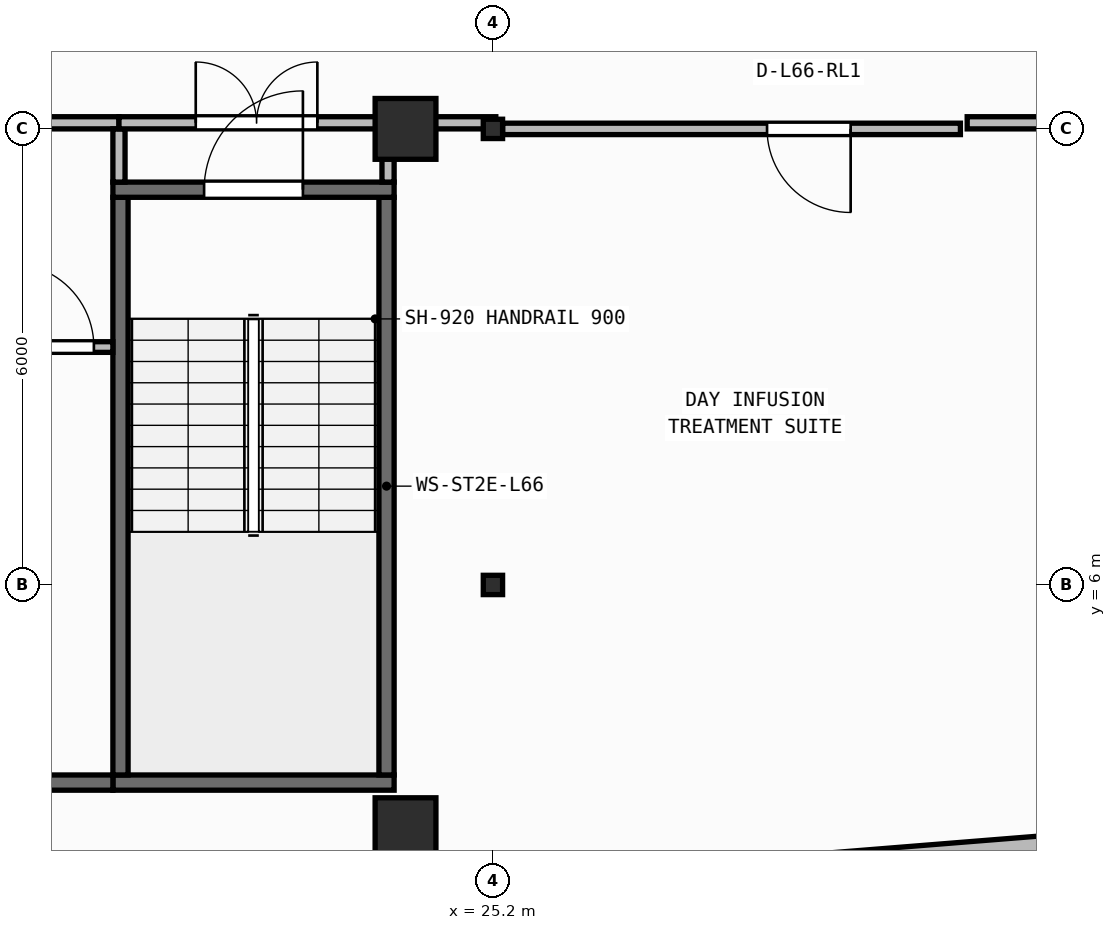
"""IFC4 building model, lengths in metres.
Left out: names, types, materials, properties, quantities, classifications, styles, units other than length and angle.
Written with IfcOpenShell. Run it as: python <this file> out.ifc"""

import sys

from ifc_helpers import new_model, si_unit, direction, frame, frame_2d, origin, origin_2d, place, context, subcontext, project, spatial, rectangle, i_section, extrude, element, fill, save


model = new_model("IFC4")
c1 = context("Model", 3, precision=1e-05, world=origin(), true_north=direction((0.0, 1.0)))
c2 = subcontext(c1, "Body", "Model", "MODEL_VIEW")
j1 = project(units=[si_unit("LENGTHUNIT", "METRE"), si_unit("PLANEANGLEUNIT", "RADIAN")], contexts=[c1])
p1 = place(None, origin())
s1 = spatial("IfcSite", under=j1, at=p1, CompositionType="ELEMENT")
p2 = place(p1, origin())
s2 = spatial("IfcBuilding", under=s1, at=p2, CompositionType="ELEMENT")
p3 = place(p2, frame((0.0, 0.0, 268.4)))
s3 = spatial("IfcBuildingStorey", under=s2, at=p3, CompositionType="ELEMENT", Elevation=268.4)
p4 = place(p3, frame((24.05, 2.8, 0.0), z_axis=(0.0, 0.0, 1.0), x_axis=(1.0, 0.0, 0.0)))
e1 = element("IfcColumn", 1, at=p4, inside=s3, PredefinedType="COLUMN", context=c2, shape_type="SweptSolid", body=[
    extrude(rectangle(XDim=0.8, YDim=0.8, at=origin_2d()), origin(), (0.0, 0.0, 1.0), 3.95),
])
p5 = place(p3, frame((25.2, 6.0, 0.0), z_axis=(0.0, 0.0, 1.0), x_axis=(1.0, 0.0, 0.0)))
e2 = element("IfcColumn", 2, at=p5, inside=s3, PredefinedType="COLUMN", context=c2, shape_type="SweptSolid", body=[
    extrude(i_section(OverallWidth=0.254, OverallDepth=0.254, WebThickness=0.009, FlangeThickness=0.014, FilletRadius=0.013, at=origin_2d()), origin(), (0.0, 0.0, 1.0), 3.95),
])
p6 = place(p3, frame((24.05, 12.0, 0.0), z_axis=(0.0, 0.0, 1.0), x_axis=(1.0, 0.0, 0.0)))
e3 = element("IfcColumn", 3, at=p6, inside=s3, PredefinedType="COLUMN", context=c2, shape_type="SweptSolid", body=[
    extrude(rectangle(XDim=0.8, YDim=0.8, at=origin_2d()), origin(), (0.0, 0.0, 1.0), 3.95),
])
p7 = place(p3, frame((25.2, 12.0, 0.0), z_axis=(0.0, 0.0, 1.0), x_axis=(1.0, 0.0, 0.0)))
e4 = element("IfcColumn", 4, at=p7, inside=s3, PredefinedType="COLUMN", context=c2, shape_type="SweptSolid", body=[
    extrude(i_section(OverallWidth=0.254, OverallDepth=0.254, WebThickness=0.009, FlangeThickness=0.014, FilletRadius=0.013, at=origin_2d()), origin(), (0.0, 0.0, 1.0), 3.95),
])
p8 = place(p3, frame((2.56, 0.173, 0.0), z_axis=(0.0, 0.0, 1.0), x_axis=(0.996798206282, 0.079958338856, 0.0)))
e5 = element("IfcWall", 5, at=p8, inside=s3, PredefinedType="STANDARD", context=c2, shape_type="SweptSolid", body=[
    extrude(rectangle(XDim=37.199, YDim=0.26, at=frame_2d((18.6, 0.0))), origin(), (0.0, 0.0, 1.0), 3.71),
])
p9 = place(p8, frame((17.4, 0.0, 0.9)))
e6 = element("IfcOpeningElement", 6, at=p9, cuts=e5, PredefinedType="OPENING", context=c2, shape_type="SweptSolid", body=[
    extrude(rectangle(XDim=2.4, YDim=1.65, at=frame_2d((1.2, 0.825))), frame((0.0, 0.14, 0.0), z_axis=(0.0, -1.0, 0.0), x_axis=(1.0, 0.0, 0.0)), (0.0, 0.0, 1.0), 0.28),
])
p10 = place(p3, frame((20.2, 3.4, 0.0), z_axis=(0.0, 0.0, 1.0), x_axis=(1.0, 0.0, 0.0)))
e7 = element("IfcWall", 7, at=p10, inside=s3, PredefinedType="SHEAR", context=c2, shape_type="SweptSolid", body=[
    extrude(rectangle(XDim=3.7, YDim=0.2, at=frame_2d((1.85, 0.0))), origin(), (0.0, 0.0, 1.0), 3.71),
])
for number, where, z_axis, x_axis in (
    (8, (20.3, 3.5, 0.0), (0.0, 0.0, 1.0), (0.0, 1.0, 0.0)),
    (9, (23.8, 3.5, 0.0), (0.0, 0.0, 1.0), (0.0, 1.0, 0.0)),
):
    element("IfcWall", number, at=place(p3, frame(where, z_axis=z_axis, x_axis=x_axis)), inside=s3, PredefinedType="SHEAR", context=c2, shape_type="SweptSolid", body=[
        extrude(rectangle(XDim=7.6, YDim=0.2, at=frame_2d((3.8, 0.0))), origin(), (0.0, 0.0, 1.0), 3.71),
    ])
p11 = place(p3, frame((20.2, 11.2, 0.0), z_axis=(0.0, 0.0, 1.0), x_axis=(1.0, 0.0, 0.0)))
e10 = element("IfcWall", 10, at=p11, inside=s3, PredefinedType="SHEAR", context=c2, shape_type="SweptSolid", body=[
    extrude(rectangle(XDim=3.7, YDim=0.2, at=frame_2d((1.85, 0.0))), origin(), (0.0, 0.0, 1.0), 3.71),
])
p12 = place(p11, frame((1.2, 0.0, 0.0)))
e11 = element("IfcOpeningElement", 11, at=p12, cuts=e10, PredefinedType="OPENING", context=c2, shape_type="SweptSolid", body=[
    extrude(rectangle(XDim=1.3, YDim=2.15, at=frame_2d((0.65, 1.075))), frame((0.0, 0.11, 0.0), z_axis=(0.0, -1.0, 0.0), x_axis=(1.0, 0.0, 0.0)), (0.0, 0.0, 1.0), 0.22),
])
p13 = place(p3, frame((6.5, 3.4, 0.0), z_axis=(0.0, 0.0, 1.0), x_axis=(1.0, 0.0, 0.0)))
e12 = element("IfcWall", 12, at=p13, inside=s3, PredefinedType="SHEAR", context=c2, shape_type="SweptSolid", body=[
    extrude(rectangle(XDim=13.7, YDim=0.2, at=frame_2d((6.85, 0.0))), origin(), (0.0, 0.0, 1.0), 3.71),
])
p14 = place(p3, frame((18.61, 9.13, 0.0), z_axis=(0.0, 0.0, 1.0), x_axis=(1.0, 0.0, 0.0)))
e13 = element("IfcWall", 13, at=p14, inside=s3, PredefinedType="PARTITIONING", context=c2, shape_type="SweptSolid", body=[
    extrude(rectangle(XDim=1.59, YDim=0.14, at=frame_2d((0.795, 0.0))), origin(), (0.0, 0.0, 1.0), 3.71),
])
p15 = place(p14, frame((0.24, 0.0, 0.0)))
e14 = element("IfcOpeningElement", 14, at=p15, cuts=e13, PredefinedType="OPENING", context=c2, shape_type="SweptSolid", body=[
    extrude(rectangle(XDim=1.1, YDim=2.1, at=frame_2d((0.55, 1.05))), frame((0.0, 0.08, 0.0), z_axis=(0.0, -1.0, 0.0), x_axis=(1.0, 0.0, 0.0)), (0.0, 0.0, 1.0), 0.16),
])
p16 = place(p3, frame((12.58, 12.08, 0.0), z_axis=(0.0, 0.0, 1.0), x_axis=(1.0, 0.0, 0.0)))
e15 = element("IfcWall", 15, at=p16, inside=s3, PredefinedType="PARTITIONING", context=c2, shape_type="SweptSolid", body=[
    extrude(rectangle(XDim=7.7, YDim=0.16, at=frame_2d((3.85, 0.0))), origin(), (0.0, 0.0, 1.0), 3.157),
])
p17 = place(p16, frame((3.05, 0.0, 0.0)))
e16 = element("IfcOpeningElement", 16, at=p17, cuts=e15, PredefinedType="OPENING", context=c2, shape_type="SweptSolid", body=[
    extrude(rectangle(XDim=1.6, YDim=2.05, at=frame_2d((0.8, 1.025))), frame((0.0, 0.09, 0.0), z_axis=(0.0, -1.0, 0.0), x_axis=(1.0, 0.0, 0.0)), (0.0, 0.0, 1.0), 0.18),
])
p18 = place(p3, frame((20.28, 11.3, 0.0), z_axis=(0.0, 0.0, 1.0), x_axis=(0.0, 1.0, 0.0)))
e17 = element("IfcWall", 17, at=p18, inside=s3, PredefinedType="PARTITIONING", context=c2, shape_type="SweptSolid", body=[
    extrude(rectangle(XDim=0.7, YDim=0.16, at=frame_2d((0.35, 0.0))), origin(), (0.0, 0.0, 1.0), 3.71),
])
p19 = place(p3, frame((20.28, 12.08, 0.0), z_axis=(0.0, 0.0, 1.0), x_axis=(1.0, 0.0, 0.0)))
e18 = element("IfcWall", 18, at=p19, inside=s3, PredefinedType="PARTITIONING", context=c2, shape_type="SweptSolid", body=[
    extrude(rectangle(XDim=3.62, YDim=0.16, at=frame_2d((1.81, 0.0))), origin(), (0.0, 0.0, 1.0), 3.157),
])
p20 = place(p19, frame((1.01, 0.0, 0.0)))
e19 = element("IfcOpeningElement", 19, at=p20, cuts=e18, PredefinedType="OPENING", context=c2, shape_type="SweptSolid", body=[
    extrude(rectangle(XDim=1.6, YDim=2.05, at=frame_2d((0.8, 1.025))), frame((0.0, 0.09, 0.0), z_axis=(0.0, -1.0, 0.0), x_axis=(1.0, 0.0, 0.0)), (0.0, 0.0, 1.0), 0.18),
])
p21 = place(p3, frame((23.82, 11.3, 0.0), z_axis=(0.0, 0.0, 1.0), x_axis=(0.0, 1.0, 0.0)))
e20 = element("IfcWall", 20, at=p21, inside=s3, PredefinedType="PARTITIONING", context=c2, shape_type="SweptSolid", body=[
    extrude(rectangle(XDim=0.7, YDim=0.16, at=frame_2d((0.35, 0.0))), origin(), (0.0, 0.0, 1.0), 3.71),
])
p22 = place(p3, frame((31.35, 12.0, 0.0), z_axis=(0.0, 0.0, 1.0), x_axis=(-1.0, 0.0, 0.0)))
e21 = element("IfcWall", 21, at=p22, inside=s3, PredefinedType="PARTITIONING", context=c2, shape_type="SweptSolid", body=[
    extrude(rectangle(XDim=6.023, YDim=0.15, at=frame_2d((3.012, 0.0))), origin(), (0.0, 0.0, 1.0), 3.157),
])
p23 = place(p22, frame((1.444, 0.0, 0.0)))
e22 = element("IfcOpeningElement", 22, at=p23, cuts=e21, PredefinedType="OPENING", context=c2, shape_type="SweptSolid", body=[
    extrude(rectangle(XDim=1.1, YDim=2.1, at=frame_2d((0.55, 1.05))), frame((0.0, 0.085, 0.0), z_axis=(0.0, -1.0, 0.0), x_axis=(1.0, 0.0, 0.0)), (0.0, 0.0, 1.0), 0.17),
])
p24 = place(p3, frame((24.02, 12.08, 0.0), z_axis=(0.0, 0.0, 1.0), x_axis=(1.0, 0.0, 0.0)))
e23 = element("IfcWall", 23, at=p24, inside=s3, PredefinedType="PARTITIONING", context=c2, shape_type="SweptSolid", body=[
    extrude(rectangle(XDim=1.218, YDim=0.16, at=frame_2d((0.609, 0.0))), origin(), (0.0, 0.0, 1.0), 3.157),
])
p25 = place(p3, frame((31.439, 12.08, 0.0), z_axis=(0.0, 0.0, 1.0), x_axis=(1.0, 0.0, 0.0)))
e24 = element("IfcWall", 24, at=p25, inside=s3, PredefinedType="PARTITIONING", context=c2, shape_type="SweptSolid", body=[
    extrude(rectangle(XDim=2.198, YDim=0.16, at=frame_2d((1.099, 0.0))), origin(), (0.0, 0.0, 1.0), 3.157),
])
p26 = place(p12, origin())
e25 = element("IfcDoor", 25, at=p26, inside=s3, OperationType="SINGLE_SWING_RIGHT", PredefinedType="DOOR", context=c2, shape_type="SweptSolid", body=[
    extrude(rectangle(XDim=1.3, YDim=2.15, at=frame_2d((0.65, 1.075))), frame((0.0, 0.025, 0.0), z_axis=(0.0, -1.0, 0.0), x_axis=(1.0, 0.0, 0.0)), (0.0, 0.0, 1.0), 0.05),
])
fill(e11, e25)
p27 = place(p15, origin())
e26 = element("IfcDoor", 26, at=p27, inside=s3, OperationType="SINGLE_SWING_LEFT", PredefinedType="DOOR", context=c2, shape_type="SweptSolid", body=[
    extrude(rectangle(XDim=1.1, YDim=2.1, at=frame_2d((0.55, 1.05))), frame((0.0, 0.025, 0.0), z_axis=(0.0, -1.0, 0.0), x_axis=(1.0, 0.0, 0.0)), (0.0, 0.0, 1.0), 0.05),
])
fill(e14, e26)
p28 = place(p20, origin())
e27 = element("IfcDoor", 27, at=p28, inside=s3, OperationType="DOUBLE_DOOR_SINGLE_SWING", PredefinedType="DOOR", context=c2, shape_type="SweptSolid", body=[
    extrude(rectangle(XDim=1.6, YDim=2.05, at=frame_2d((0.8, 1.025))), frame((0.0, 0.025, 0.0), z_axis=(0.0, -1.0, 0.0), x_axis=(1.0, 0.0, 0.0)), (0.0, 0.0, 1.0), 0.05),
])
fill(e19, e27)
p29 = place(p23, origin())
e28 = element("IfcDoor", 28, at=p29, inside=s3, OperationType="SINGLE_SWING_LEFT", PredefinedType="DOOR", context=c2, shape_type="SweptSolid", body=[
    extrude(rectangle(XDim=1.1, YDim=2.1, at=frame_2d((0.55, 1.05))), frame((0.0, 0.025, 0.0), z_axis=(0.0, -1.0, 0.0), x_axis=(1.0, 0.0, 0.0)), (0.0, 0.0, 1.0), 0.05),
])
fill(e22, e28)
save(model, sys.argv[1])
